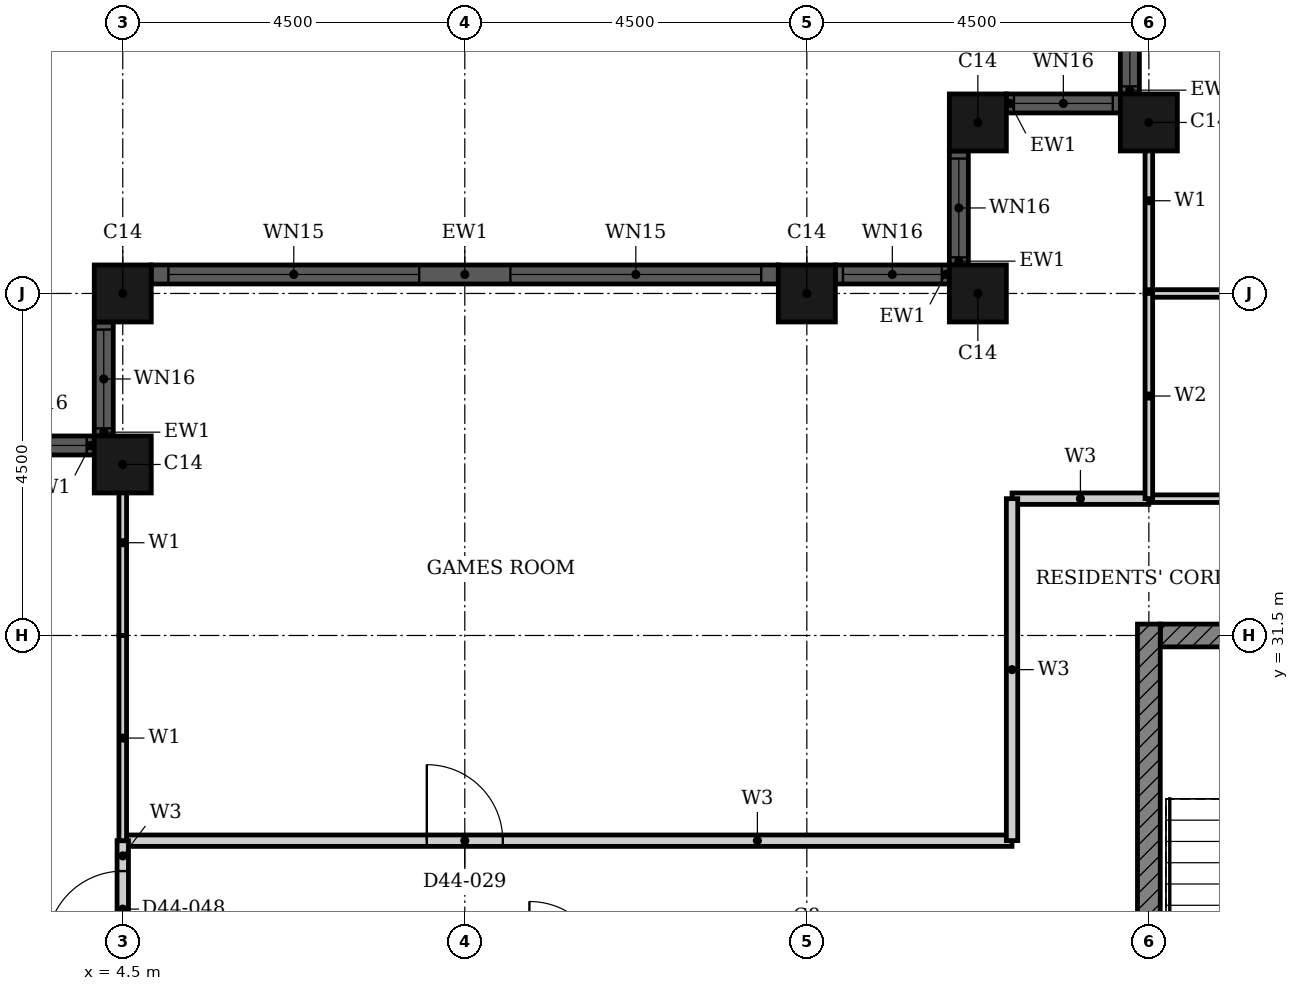
"""IFC4 building model, lengths in metres.
Left out: names, types, materials, properties, quantities, classifications, styles, units other than length and angle.
Written with IfcOpenShell. Run it as: python <this file> out.ifc"""

import sys

from ifc_helpers import new_model, si_unit, direction, frame, frame_2d, origin, origin_2d, place, context, subcontext, project, spatial, rectangle, hollow_rectangle, extrude, element, fill, save


model = new_model("IFC4")
c1 = context("Model", 3, precision=1e-05, world=origin(), true_north=direction((0.0, 1.0)))
c2 = subcontext(c1, "Body", "Model", "MODEL_VIEW")
j1 = project(units=[si_unit("LENGTHUNIT", "METRE"), si_unit("PLANEANGLEUNIT", "RADIAN")], contexts=[c1])
p1 = place(None, origin())
s1 = spatial("IfcSite", under=j1, at=p1, CompositionType="ELEMENT")
p2 = place(p1, origin())
s2 = spatial("IfcBuilding", under=s1, at=p2, CompositionType="ELEMENT")
p3 = place(p2, frame((0.0, 0.0, 176.5)))
s3 = spatial("IfcBuildingStorey", under=s2, at=p3, CompositionType="ELEMENT", Elevation=176.5)
for number, where, z_axis, x_axis in (
    (1, (18.0, 38.25, 0.0), (0.0, 0.0, 1.0), (1.0, 0.0, 0.0)),
    (2, (15.75, 38.25, 0.0), (0.0, 0.0, 1.0), (1.0, 0.0, 0.0)),
    (3, (15.75, 36.0, 0.0), (0.0, 0.0, 1.0), (1.0, 0.0, 0.0)),
    (4, (13.5, 36.0, 0.0), (0.0, 0.0, 1.0), (1.0, 0.0, 0.0)),
    (5, (4.5, 36.0, 0.0), (0.0, 0.0, 1.0), (1.0, 0.0, 0.0)),
    (6, (4.5, 33.75, 0.0), (0.0, 0.0, 1.0), (1.0, 0.0, 0.0)),
):
    element("IfcColumn", number, at=place(p3, frame(where, z_axis=z_axis, x_axis=x_axis)), inside=s3, PredefinedType="COLUMN", context=c2, shape_type="SweptSolid", body=[
        extrude(hollow_rectangle(XDim=0.75, YDim=0.75, WallThickness=0.024, at=origin_2d()), origin(), (0.0, 0.0, 1.0), 3.7),
    ])
p4 = place(p3, frame((17.75, 40.125, 0.0), z_axis=(0.0, 0.0, 1.0), x_axis=(0.0, -1.0, 0.0)))
e7 = element("IfcWall", 7, at=p4, inside=s3, PredefinedType="SOLIDWALL", context=c2, shape_type="SweptSolid", body=[
    extrude(rectangle(XDim=1.5, YDim=0.25, at=frame_2d((0.75, 0.0))), origin(), (0.0, 0.0, 1.0), 3.7),
])
p5 = place(p4, frame((0.1, 0.0, 0.9)))
e8 = element("IfcOpeningElement", 8, at=p5, cuts=e7, PredefinedType="OPENING", context=c2, shape_type="SweptSolid", body=[
    extrude(rectangle(XDim=1.3, YDim=1.85, at=frame_2d((0.65, 0.925))), frame((0.0, 0.135, 0.0), z_axis=(0.0, -1.0, 0.0), x_axis=(1.0, 0.0, 0.0)), (0.0, 0.0, 1.0), 0.27),
])
p6 = place(p3, frame((17.625, 38.5, 0.0), z_axis=(0.0, 0.0, 1.0), x_axis=(-1.0, 0.0, 0.0)))
e9 = element("IfcWall", 9, at=p6, inside=s3, PredefinedType="SOLIDWALL", context=c2, shape_type="SweptSolid", body=[
    extrude(rectangle(XDim=1.5, YDim=0.25, at=frame_2d((0.75, 0.0))), origin(), (0.0, 0.0, 1.0), 3.7),
])
p7 = place(p6, frame((0.1, 0.0, 0.9)))
e10 = element("IfcOpeningElement", 10, at=p7, cuts=e9, PredefinedType="OPENING", context=c2, shape_type="SweptSolid", body=[
    extrude(rectangle(XDim=1.3, YDim=1.85, at=frame_2d((0.65, 0.925))), frame((0.0, 0.135, 0.0), z_axis=(0.0, -1.0, 0.0), x_axis=(1.0, 0.0, 0.0)), (0.0, 0.0, 1.0), 0.27),
])
p8 = place(p3, frame((15.5, 37.875, 0.0), z_axis=(0.0, 0.0, 1.0), x_axis=(0.0, -1.0, 0.0)))
e11 = element("IfcWall", 11, at=p8, inside=s3, PredefinedType="SOLIDWALL", context=c2, shape_type="SweptSolid", body=[
    extrude(rectangle(XDim=1.5, YDim=0.25, at=frame_2d((0.75, 0.0))), origin(), (0.0, 0.0, 1.0), 3.7),
])
p9 = place(p8, frame((0.1, 0.0, 0.9)))
e12 = element("IfcOpeningElement", 12, at=p9, cuts=e11, PredefinedType="OPENING", context=c2, shape_type="SweptSolid", body=[
    extrude(rectangle(XDim=1.3, YDim=1.85, at=frame_2d((0.65, 0.925))), frame((0.0, 0.135, 0.0), z_axis=(0.0, -1.0, 0.0), x_axis=(1.0, 0.0, 0.0)), (0.0, 0.0, 1.0), 0.27),
])
p10 = place(p3, frame((15.375, 36.25, 0.0), z_axis=(0.0, 0.0, 1.0), x_axis=(-1.0, 0.0, 0.0)))
e13 = element("IfcWall", 13, at=p10, inside=s3, PredefinedType="SOLIDWALL", context=c2, shape_type="SweptSolid", body=[
    extrude(rectangle(XDim=1.5, YDim=0.25, at=frame_2d((0.75, 0.0))), origin(), (0.0, 0.0, 1.0), 3.7),
])
p11 = place(p10, frame((0.1, 0.0, 0.9)))
e14 = element("IfcOpeningElement", 14, at=p11, cuts=e13, PredefinedType="OPENING", context=c2, shape_type="SweptSolid", body=[
    extrude(rectangle(XDim=1.3, YDim=1.85, at=frame_2d((0.65, 0.925))), frame((0.0, 0.135, 0.0), z_axis=(0.0, -1.0, 0.0), x_axis=(1.0, 0.0, 0.0)), (0.0, 0.0, 1.0), 0.27),
])
p12 = place(p3, frame((13.125, 36.25, 0.0), z_axis=(0.0, 0.0, 1.0), x_axis=(-1.0, 0.0, 0.0)))
e15 = element("IfcWall", 15, at=p12, inside=s3, PredefinedType="SOLIDWALL", context=c2, shape_type="SweptSolid", body=[
    extrude(rectangle(XDim=8.25, YDim=0.25, at=frame_2d((4.125, 0.0))), origin(), (0.0, 0.0, 1.0), 3.7),
])
p13 = place(p12, frame((0.225, 0.0, 0.45)))
e16 = element("IfcOpeningElement", 16, at=p13, cuts=e15, PredefinedType="OPENING", context=c2, shape_type="SweptSolid", body=[
    extrude(rectangle(XDim=3.3, YDim=2.3, at=frame_2d((1.65, 1.15))), frame((0.0, 0.135, 0.0), z_axis=(0.0, -1.0, 0.0), x_axis=(1.0, 0.0, 0.0)), (0.0, 0.0, 1.0), 0.27),
])
p14 = place(p12, frame((4.725, 0.0, 0.45)))
e17 = element("IfcOpeningElement", 17, at=p14, cuts=e15, PredefinedType="OPENING", context=c2, shape_type="SweptSolid", body=[
    extrude(rectangle(XDim=3.3, YDim=2.3, at=frame_2d((1.65, 1.15))), frame((0.0, 0.135, 0.0), z_axis=(0.0, -1.0, 0.0), x_axis=(1.0, 0.0, 0.0)), (0.0, 0.0, 1.0), 0.27),
])
p15 = place(p3, frame((4.25, 35.625, 0.0), z_axis=(0.0, 0.0, 1.0), x_axis=(0.0, -1.0, 0.0)))
e18 = element("IfcWall", 18, at=p15, inside=s3, PredefinedType="SOLIDWALL", context=c2, shape_type="SweptSolid", body=[
    extrude(rectangle(XDim=1.5, YDim=0.25, at=frame_2d((0.75, 0.0))), origin(), (0.0, 0.0, 1.0), 3.7),
])
p16 = place(p15, frame((0.1, 0.0, 0.9)))
e19 = element("IfcOpeningElement", 19, at=p16, cuts=e18, PredefinedType="OPENING", context=c2, shape_type="SweptSolid", body=[
    extrude(rectangle(XDim=1.3, YDim=1.85, at=frame_2d((0.65, 0.925))), frame((0.0, 0.135, 0.0), z_axis=(0.0, -1.0, 0.0), x_axis=(1.0, 0.0, 0.0)), (0.0, 0.0, 1.0), 0.27),
])
p17 = place(p3, frame((4.125, 34.0, 0.0), z_axis=(0.0, 0.0, 1.0), x_axis=(-1.0, 0.0, 0.0)))
e20 = element("IfcWall", 20, at=p17, inside=s3, PredefinedType="SOLIDWALL", context=c2, shape_type="SweptSolid", body=[
    extrude(rectangle(XDim=1.5, YDim=0.25, at=frame_2d((0.75, 0.0))), origin(), (0.0, 0.0, 1.0), 3.7),
])
p18 = place(p17, frame((0.1, 0.0, 0.9)))
e21 = element("IfcOpeningElement", 21, at=p18, cuts=e20, PredefinedType="OPENING", context=c2, shape_type="SweptSolid", body=[
    extrude(rectangle(XDim=1.3, YDim=1.85, at=frame_2d((0.65, 0.925))), frame((0.0, 0.135, 0.0), z_axis=(0.0, -1.0, 0.0), x_axis=(1.0, 0.0, 0.0)), (0.0, 0.0, 1.0), 0.27),
])
p19 = place(p3, frame((18.15, 31.5, 0.0), z_axis=(0.0, 0.0, 1.0), x_axis=(1.0, 0.0, 0.0)))
e22 = element("IfcWall", 22, at=p19, inside=s3, PredefinedType="SHEAR", context=c2, shape_type="SweptSolid", body=[
    extrude(rectangle(XDim=9.368, YDim=0.3, at=frame_2d((4.684, 0.0))), origin(), (0.0, 0.0, 1.0), 3.4),
])
p20 = place(p19, frame((4.736, 0.0, 0.0)))
e23 = element("IfcOpeningElement", 23, at=p20, cuts=e22, PredefinedType="OPENING", context=c2, shape_type="SweptSolid", body=[
    extrude(rectangle(XDim=1.8, YDim=2.1, at=frame_2d((0.9, 1.05))), frame((0.0, 0.16, 0.0), z_axis=(0.0, -1.0, 0.0), x_axis=(1.0, 0.0, 0.0)), (0.0, 0.0, 1.0), 0.32),
])
p21 = place(p3, frame((18.0, 22.35, 0.0), z_axis=(0.0, 0.0, 1.0), x_axis=(0.0, 1.0, 0.0)))
e24 = element("IfcWall", 24, at=p21, inside=s3, PredefinedType="SHEAR", context=c2, shape_type="SweptSolid", body=[
    extrude(rectangle(XDim=9.3, YDim=0.3, at=frame_2d((4.65, 0.0))), origin(), (0.0, 0.0, 1.0), 3.4),
])
p22 = place(p3, frame((4.5, 28.8, 0.0), z_axis=(0.0, 0.0, 1.0), x_axis=(1.0, 0.0, 0.0)))
e25 = element("IfcWall", 25, at=p22, inside=s3, PredefinedType="PARTITIONING", context=c2, shape_type="SweptSolid", body=[
    extrude(rectangle(XDim=11.699, YDim=0.15, at=frame_2d((5.85, 0.0))), origin(), (0.0, 0.0, 1.0), 3.4),
])
p23 = place(p22, frame((4.0, 0.0, 0.0)))
e26 = element("IfcOpeningElement", 26, at=p23, cuts=e25, PredefinedType="OPENING", context=c2, shape_type="SweptSolid", body=[
    extrude(rectangle(XDim=1.0, YDim=2.1, at=frame_2d((0.5, 1.05))), frame((0.0, 0.085, 0.0), z_axis=(0.0, -1.0, 0.0), x_axis=(1.0, 0.0, 0.0)), (0.0, 0.0, 1.0), 0.17),
])
p24 = place(p3, frame((16.2, 33.3, 0.0), z_axis=(0.0, 0.0, 1.0), x_axis=(1.0, 0.0, 0.0)))
e27 = element("IfcWall", 27, at=p24, inside=s3, PredefinedType="PARTITIONING", context=c2, shape_type="SweptSolid", body=[
    extrude(rectangle(XDim=1.799, YDim=0.15, at=frame_2d((0.899, 0.0))), origin(), (0.0, 0.0, 1.0), 3.4),
])
p25 = place(p3, frame((16.2, 28.801, 0.0), z_axis=(0.0, 0.0, 1.0), x_axis=(0.0, 1.0, 0.0)))
e28 = element("IfcWall", 28, at=p25, inside=s3, PredefinedType="PARTITIONING", context=c2, shape_type="SweptSolid", body=[
    extrude(rectangle(XDim=4.499, YDim=0.15, at=frame_2d((2.25, 0.0))), origin(), (0.0, 0.0, 1.0), 3.4),
])
p26 = place(p3, frame((4.5, 27.0, 0.0), z_axis=(0.0, 0.0, 1.0), x_axis=(0.0, 1.0, 0.0)))
e29 = element("IfcWall", 29, at=p26, inside=s3, PredefinedType="PARTITIONING", context=c2, shape_type="SweptSolid", body=[
    extrude(rectangle(XDim=1.8, YDim=0.15, at=frame_2d((0.9, 0.0))), origin(), (0.0, 0.0, 1.0), 3.4),
])
p27 = place(p26, frame((0.4, 0.0, 0.0)))
e30 = element("IfcOpeningElement", 30, at=p27, cuts=e29, PredefinedType="OPENING", context=c2, shape_type="SweptSolid", body=[
    extrude(rectangle(XDim=1.0, YDim=2.2, at=frame_2d((0.5, 1.1))), frame((0.0, 0.085, 0.0), z_axis=(0.0, -1.0, 0.0), x_axis=(1.0, 0.0, 0.0)), (0.0, 0.0, 1.0), 0.17),
])
p28 = place(p3, frame((18.0, 36.0, 0.0), z_axis=(0.0, 0.0, 1.0), x_axis=(0.0, 1.0, 0.0)))
e31 = element("IfcWall", 31, at=p28, inside=s3, PredefinedType="PARTITIONING", context=c2, shape_type="SweptSolid", body=[
    extrude(rectangle(XDim=2.44, YDim=0.1, at=frame_2d((1.22, 0.0))), origin(), (0.0, 0.0, 1.0), 3.4),
])
p29 = place(p3, frame((4.5, 28.8, 0.0), z_axis=(0.0, 0.0, 1.0), x_axis=(0.0, 1.0, 0.0)))
e32 = element("IfcWall", 32, at=p29, inside=s3, PredefinedType="PARTITIONING", context=c2, shape_type="SweptSolid", body=[
    extrude(rectangle(XDim=2.7, YDim=0.1, at=frame_2d((1.35, 0.0))), origin(), (0.0, 0.0, 1.0), 3.4),
])
p30 = place(p3, frame((4.5, 31.501, 0.0), z_axis=(0.0, 0.0, 1.0), x_axis=(0.0, 1.0, 0.0)))
e33 = element("IfcWall", 33, at=p30, inside=s3, PredefinedType="PARTITIONING", context=c2, shape_type="SweptSolid", body=[
    extrude(rectangle(XDim=2.439, YDim=0.1, at=frame_2d((1.219, 0.0))), origin(), (0.0, 0.0, 1.0), 3.4),
])
p31 = place(p3, frame((18.0, 33.3, 0.0), z_axis=(0.0, 0.0, 1.0), x_axis=(1.0, 0.0, 0.0)))
e34 = element("IfcWall", 34, at=p31, inside=s3, PredefinedType="PARTITIONING", context=c2, shape_type="SweptSolid", body=[
    extrude(rectangle(XDim=3.6, YDim=0.1, at=frame_2d((1.8, 0.0))), origin(), (0.0, 0.0, 1.0), 3.4),
])
p32 = place(p3, frame((18.0, 36.0, 0.0), z_axis=(0.0, 0.0, 1.0), x_axis=(1.0, 0.0, 0.0)))
e35 = element("IfcWall", 35, at=p32, inside=s3, PredefinedType="PARTITIONING", context=c2, shape_type="SweptSolid", body=[
    extrude(rectangle(XDim=3.6, YDim=0.1, at=frame_2d((1.8, 0.0))), origin(), (0.0, 0.0, 1.0), 3.4),
])
p33 = place(p32, frame((1.4, 0.0, 0.0)))
e36 = element("IfcOpeningElement", 36, at=p33, cuts=e35, PredefinedType="OPENING", context=c2, shape_type="SweptSolid", body=[
    extrude(rectangle(XDim=0.8, YDim=2.1, at=frame_2d((0.4, 1.05))), frame((0.0, 0.06, 0.0), z_axis=(0.0, -1.0, 0.0), x_axis=(1.0, 0.0, 0.0)), (0.0, 0.0, 1.0), 0.12),
])
p34 = place(p3, frame((18.0, 33.301, 0.0), z_axis=(0.0, 0.0, 1.0), x_axis=(0.0, 1.0, 0.0)))
e37 = element("IfcWall", 37, at=p34, inside=s3, PredefinedType="PARTITIONING", context=c2, shape_type="SweptSolid", body=[
    extrude(rectangle(XDim=2.699, YDim=0.1, at=frame_2d((1.35, 0.0))), origin(), (0.0, 0.0, 1.0), 3.4),
])
p35 = place(p5, origin())
e38 = element("IfcWindow", 38, at=p35, inside=s3, PartitioningType="SINGLE_PANEL", PredefinedType="WINDOW", context=c2, shape_type="SweptSolid", body=[
    extrude(rectangle(XDim=1.3, YDim=1.85, at=frame_2d((0.65, 0.925))), frame((0.0, 0.03, 0.0), z_axis=(0.0, -1.0, 0.0), x_axis=(1.0, 0.0, 0.0)), (0.0, 0.0, 1.0), 0.06),
])
fill(e8, e38)
p36 = place(p7, origin())
e39 = element("IfcWindow", 39, at=p36, inside=s3, PartitioningType="SINGLE_PANEL", PredefinedType="WINDOW", context=c2, shape_type="SweptSolid", body=[
    extrude(rectangle(XDim=1.3, YDim=1.85, at=frame_2d((0.65, 0.925))), frame((0.0, 0.03, 0.0), z_axis=(0.0, -1.0, 0.0), x_axis=(1.0, 0.0, 0.0)), (0.0, 0.0, 1.0), 0.06),
])
fill(e10, e39)
p37 = place(p9, origin())
e40 = element("IfcWindow", 40, at=p37, inside=s3, PartitioningType="SINGLE_PANEL", PredefinedType="WINDOW", context=c2, shape_type="SweptSolid", body=[
    extrude(rectangle(XDim=1.3, YDim=1.85, at=frame_2d((0.65, 0.925))), frame((0.0, 0.03, 0.0), z_axis=(0.0, -1.0, 0.0), x_axis=(1.0, 0.0, 0.0)), (0.0, 0.0, 1.0), 0.06),
])
fill(e12, e40)
p38 = place(p11, origin())
e41 = element("IfcWindow", 41, at=p38, inside=s3, PartitioningType="SINGLE_PANEL", PredefinedType="WINDOW", context=c2, shape_type="SweptSolid", body=[
    extrude(rectangle(XDim=1.3, YDim=1.85, at=frame_2d((0.65, 0.925))), frame((0.0, 0.03, 0.0), z_axis=(0.0, -1.0, 0.0), x_axis=(1.0, 0.0, 0.0)), (0.0, 0.0, 1.0), 0.06),
])
fill(e14, e41)
p39 = place(p13, origin())
e42 = element("IfcWindow", 42, at=p39, inside=s3, PartitioningType="SINGLE_PANEL", PredefinedType="WINDOW", context=c2, shape_type="SweptSolid", body=[
    extrude(rectangle(XDim=3.3, YDim=2.3, at=frame_2d((1.65, 1.15))), frame((0.0, 0.03, 0.0), z_axis=(0.0, -1.0, 0.0), x_axis=(1.0, 0.0, 0.0)), (0.0, 0.0, 1.0), 0.06),
])
fill(e16, e42)
p40 = place(p14, origin())
e43 = element("IfcWindow", 43, at=p40, inside=s3, PartitioningType="SINGLE_PANEL", PredefinedType="WINDOW", context=c2, shape_type="SweptSolid", body=[
    extrude(rectangle(XDim=3.3, YDim=2.3, at=frame_2d((1.65, 1.15))), frame((0.0, 0.03, 0.0), z_axis=(0.0, -1.0, 0.0), x_axis=(1.0, 0.0, 0.0)), (0.0, 0.0, 1.0), 0.06),
])
fill(e17, e43)
p41 = place(p16, origin())
e44 = element("IfcWindow", 44, at=p41, inside=s3, PartitioningType="SINGLE_PANEL", PredefinedType="WINDOW", context=c2, shape_type="SweptSolid", body=[
    extrude(rectangle(XDim=1.3, YDim=1.85, at=frame_2d((0.65, 0.925))), frame((0.0, 0.03, 0.0), z_axis=(0.0, -1.0, 0.0), x_axis=(1.0, 0.0, 0.0)), (0.0, 0.0, 1.0), 0.06),
])
fill(e19, e44)
p42 = place(p18, origin())
e45 = element("IfcWindow", 45, at=p42, inside=s3, PartitioningType="SINGLE_PANEL", PredefinedType="WINDOW", context=c2, shape_type="SweptSolid", body=[
    extrude(rectangle(XDim=1.3, YDim=1.85, at=frame_2d((0.65, 0.925))), frame((0.0, 0.03, 0.0), z_axis=(0.0, -1.0, 0.0), x_axis=(1.0, 0.0, 0.0)), (0.0, 0.0, 1.0), 0.06),
])
fill(e21, e45)
p43 = place(p23, origin())
e46 = element("IfcDoor", 46, at=p43, inside=s3, OperationType="SINGLE_SWING_RIGHT", PredefinedType="DOOR", context=c2, shape_type="SweptSolid", body=[
    extrude(rectangle(XDim=1.0, YDim=2.1, at=frame_2d((0.5, 1.05))), frame((0.0, 0.025, 0.0), z_axis=(0.0, -1.0, 0.0), x_axis=(1.0, 0.0, 0.0)), (0.0, 0.0, 1.0), 0.05),
])
fill(e26, e46)
p44 = place(p27, origin())
e47 = element("IfcDoor", 47, at=p44, inside=s3, OperationType="SINGLE_SWING_LEFT", PredefinedType="DOOR", context=c2, shape_type="SweptSolid", body=[
    extrude(rectangle(XDim=1.0, YDim=2.2, at=frame_2d((0.5, 1.1))), frame((0.0, 0.025, 0.0), z_axis=(0.0, -1.0, 0.0), x_axis=(1.0, 0.0, 0.0)), (0.0, 0.0, 1.0), 0.05),
])
fill(e30, e47)
save(model, sys.argv[1])
